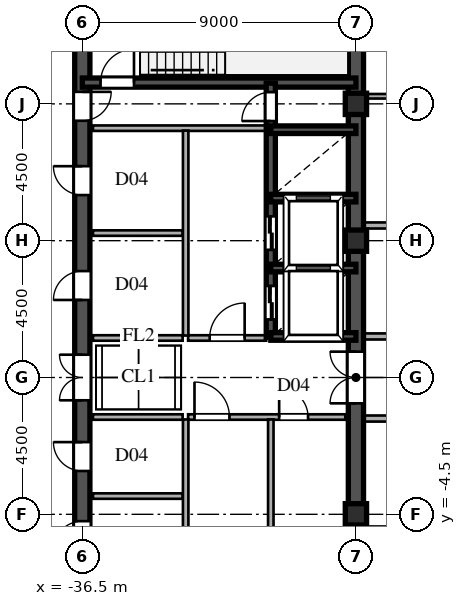
"""IFC4 building model, lengths in metres.
Left out: names, types, materials, properties, quantities, classifications, styles, units other than length and angle.
Written with IfcOpenShell. Run it as: python <this file> out.ifc"""

import sys

from ifc_helpers import new_model, si_unit, direction, frame, frame_2d, origin, origin_2d, place, context, subcontext, project, spatial, rectangle, hollow_rectangle, extrude, source, transform, mapped, element, fill, save


model = new_model("IFC4")
c1 = context("Model", 3, precision=1e-05, world=origin(), true_north=direction((0.0, 1.0)))
c2 = subcontext(c1, "Body", "Model", "MODEL_VIEW")
j1 = project(units=[si_unit("LENGTHUNIT", "METRE"), si_unit("PLANEANGLEUNIT", "RADIAN")], contexts=[c1])
p1 = place(None, origin())
s1 = spatial("IfcSite", under=j1, at=p1, CompositionType="ELEMENT")
p2 = place(p1, origin())
s2 = spatial("IfcBuilding", under=s1, at=p2, CompositionType="ELEMENT")
p3 = place(p2, frame((0.0, 0.0, 243.15)))
s3 = spatial("IfcBuildingStorey", under=s2, at=p3, CompositionType="ELEMENT", Elevation=243.15)
m1 = source(origin(), c2, "Body", "SweptSolid", [
    extrude(hollow_rectangle(XDim=0.7, YDim=0.7, WallThickness=0.03, at=origin_2d()), origin(), (0.0, 0.0, 1.0), 3.75),
])
for number, where, z_axis, x_axis in (
    (1, (-27.5, -4.5, 0.0), (0.0, 0.0, 1.0), (1.0, 0.0, 0.0)),
    (2, (-27.5, 4.5, 0.0), (0.0, 0.0, 1.0), (1.0, 0.0, 0.0)),
    (3, (-27.5, 9.0, 0.0), (0.0, 0.0, 1.0), (1.0, 0.0, 0.0)),
):
    element("IfcColumn", number, at=place(p3, frame(where, z_axis=z_axis, x_axis=x_axis)), inside=s3, PredefinedType="COLUMN", context=c2, shape_type="MappedRepresentation", body=[
        mapped(m1, transform((0.0, 0.0, 0.0), scale=1.0)),
    ])
for number, where, z_axis, x_axis in (
    (4, (-27.5, -13.5, 0.0), (0.0, 0.0, 1.0), (0.0, 1.0, 0.0)),
    (5, (-27.5, 1.3, 0.0), (0.0, 0.0, 1.0), (0.0, 1.0, 0.0)),
):
    element("IfcWall", number, at=place(p3, frame(where, z_axis=z_axis, x_axis=x_axis)), inside=s3, PredefinedType="SHEAR", context=c2, shape_type="SweptSolid", body=[
        extrude(rectangle(XDim=12.2, YDim=0.5, at=frame_2d((6.1, 0.0))), origin(), (0.0, 0.0, 1.0), 3.53),
    ])
p4 = place(p3, frame((-27.5, -1.3, 0.0), z_axis=(0.0, 0.0, 1.0), x_axis=(0.0, 1.0, 0.0)))
e6 = element("IfcWall", 6, at=p4, inside=s3, PredefinedType="SHEAR", context=c2, shape_type="SweptSolid", body=[
    extrude(rectangle(XDim=2.6, YDim=0.5, at=frame_2d((1.3, 0.0))), origin(), (0.0, 0.0, 1.0), 3.53),
])
p5 = place(p4, frame((0.45, 0.0, 0.0)))
e7 = element("IfcOpeningElement", 7, at=p5, cuts=e6, PredefinedType="OPENING", context=c2, shape_type="SweptSolid", body=[
    extrude(rectangle(XDim=1.7, YDim=2.35, at=frame_2d((0.85, 1.175))), frame((0.0, 0.26, 0.0), z_axis=(0.0, -1.0, 0.0), x_axis=(1.0, 0.0, 0.0)), (0.0, 0.0, 1.0), 0.52),
])
p6 = place(p3, frame((-36.5, -1.3, 0.0), z_axis=(0.0, 0.0, 1.0), x_axis=(0.0, 1.0, 0.0)))
e8 = element("IfcWall", 8, at=p6, inside=s3, PredefinedType="SHEAR", context=c2, shape_type="SweptSolid", body=[
    extrude(rectangle(XDim=2.6, YDim=0.5, at=frame_2d((1.3, 0.0))), origin(), (0.0, 0.0, 1.0), 3.53),
])
p7 = place(p6, frame((0.55, 0.0, 0.0)))
e9 = element("IfcOpeningElement", 9, at=p7, cuts=e8, PredefinedType="OPENING", context=c2, shape_type="SweptSolid", body=[
    extrude(rectangle(XDim=1.5, YDim=2.3, at=frame_2d((0.75, 1.15))), frame((0.0, 0.26, 0.0), z_axis=(0.0, -1.0, 0.0), x_axis=(1.0, 0.0, 0.0)), (0.0, 0.0, 1.0), 0.52),
])
p8 = place(p3, frame((-36.5, 8.2, 0.0), z_axis=(0.0, 0.0, 1.0), x_axis=(0.0, 1.0, 0.0)))
e10 = element("IfcWall", 10, at=p8, inside=s3, PredefinedType="SHEAR", context=c2, shape_type="SweptSolid", body=[
    extrude(rectangle(XDim=5.45, YDim=0.5, at=frame_2d((2.725, 0.0))), origin(), (0.0, 0.0, 1.0), 3.53),
])
p9 = place(p8, frame((0.245, 0.0, 0.0)))
e11 = element("IfcOpeningElement", 11, at=p9, cuts=e10, PredefinedType="OPENING", context=c2, shape_type="SweptSolid", body=[
    extrude(rectangle(XDim=0.95, YDim=2.15, at=frame_2d((0.475, 1.075))), frame((0.0, 0.26, 0.0), z_axis=(0.0, -1.0, 0.0), x_axis=(1.0, 0.0, 0.0)), (0.0, 0.0, 1.0), 0.52),
])
p10 = place(p3, frame((-36.5, -6.5, 0.0), z_axis=(0.0, 0.0, 1.0), x_axis=(0.0, 1.0, 0.0)))
e12 = element("IfcWall", 12, at=p10, inside=s3, PredefinedType="SHEAR", context=c2, shape_type="SweptSolid", body=[
    extrude(rectangle(XDim=2.6, YDim=0.5, at=frame_2d((1.3, 0.0))), origin(), (0.0, 0.0, 1.0), 3.53),
])
p11 = place(p10, frame((0.825, 0.0, 0.0)))
e13 = element("IfcOpeningElement", 13, at=p11, cuts=e12, PredefinedType="OPENING", context=c2, shape_type="SweptSolid", body=[
    extrude(rectangle(XDim=0.95, YDim=2.15, at=frame_2d((0.475, 1.075))), frame((0.0, 0.26, 0.0), z_axis=(0.0, -1.0, 0.0), x_axis=(1.0, 0.0, 0.0)), (0.0, 0.0, 1.0), 0.52),
])
p12 = place(p3, frame((-36.5, -3.9, 0.0), z_axis=(0.0, 0.0, 1.0), x_axis=(0.0, 1.0, 0.0)))
e14 = element("IfcWall", 14, at=p12, inside=s3, PredefinedType="SHEAR", context=c2, shape_type="SweptSolid", body=[
    extrude(rectangle(XDim=2.6, YDim=0.5, at=frame_2d((1.3, 0.0))), origin(), (0.0, 0.0, 1.0), 3.53),
])
p13 = place(p12, frame((0.825, 0.0, 0.0)))
e15 = element("IfcOpeningElement", 15, at=p13, cuts=e14, PredefinedType="OPENING", context=c2, shape_type="SweptSolid", body=[
    extrude(rectangle(XDim=0.95, YDim=2.15, at=frame_2d((0.475, 1.075))), frame((0.0, 0.26, 0.0), z_axis=(0.0, -1.0, 0.0), x_axis=(1.0, 0.0, 0.0)), (0.0, 0.0, 1.0), 0.52),
])
p14 = place(p3, frame((-36.5, 1.3, 0.0), z_axis=(0.0, 0.0, 1.0), x_axis=(0.0, 1.0, 0.0)))
e16 = element("IfcWall", 16, at=p14, inside=s3, PredefinedType="SHEAR", context=c2, shape_type="SweptSolid", body=[
    extrude(rectangle(XDim=3.45, YDim=0.5, at=frame_2d((1.725, 0.0))), origin(), (0.0, 0.0, 1.0), 3.53),
])
p15 = place(p14, frame((1.25, 0.0, 0.0)))
e17 = element("IfcOpeningElement", 17, at=p15, cuts=e16, PredefinedType="OPENING", context=c2, shape_type="SweptSolid", body=[
    extrude(rectangle(XDim=0.95, YDim=2.15, at=frame_2d((0.475, 1.075))), frame((0.0, 0.26, 0.0), z_axis=(0.0, -1.0, 0.0), x_axis=(1.0, 0.0, 0.0)), (0.0, 0.0, 1.0), 0.52),
])
p16 = place(p3, frame((-36.5, 4.75, 0.0), z_axis=(0.0, 0.0, 1.0), x_axis=(0.0, 1.0, 0.0)))
e18 = element("IfcWall", 18, at=p16, inside=s3, PredefinedType="SHEAR", context=c2, shape_type="SweptSolid", body=[
    extrude(rectangle(XDim=3.45, YDim=0.5, at=frame_2d((1.725, 0.0))), origin(), (0.0, 0.0, 1.0), 3.53),
])
p17 = place(p16, frame((1.25, 0.0, 0.0)))
e19 = element("IfcOpeningElement", 19, at=p17, cuts=e18, PredefinedType="OPENING", context=c2, shape_type="SweptSolid", body=[
    extrude(rectangle(XDim=0.95, YDim=2.15, at=frame_2d((0.475, 1.075))), frame((0.0, 0.26, 0.0), z_axis=(0.0, -1.0, 0.0), x_axis=(1.0, 0.0, 0.0)), (0.0, 0.0, 1.0), 0.52),
])
p18 = place(p3, frame((-36.5, 9.7, 0.0), z_axis=(0.0, 0.0, 1.0), x_axis=(1.0, 0.0, 0.0)))
e20 = element("IfcWall", 20, at=p18, inside=s3, PredefinedType="SHEAR", context=c2, shape_type="SweptSolid", body=[
    extrude(rectangle(XDim=9.0, YDim=0.3, at=frame_2d((4.5, 0.0))), origin(), (0.0, 0.0, 1.0), 3.53),
])
p19 = place(p18, frame((0.6, 0.0, 0.0)))
e21 = element("IfcOpeningElement", 21, at=p19, cuts=e20, PredefinedType="OPENING", context=c2, shape_type="SweptSolid", body=[
    extrude(rectangle(XDim=1.1, YDim=2.2, at=frame_2d((0.55, 1.1))), frame((0.0, 0.16, 0.0), z_axis=(0.0, -1.0, 0.0), x_axis=(1.0, 0.0, 0.0)), (0.0, 0.0, 1.0), 0.32),
])
for number, where, z_axis, x_axis in (
    (22, (-30.3, 1.35, 0.0), (0.0, 0.0, 1.0), (1.0, 0.0, 0.0)),
    (23, (-30.3, 3.6, 0.0), (0.0, 0.0, 1.0), (1.0, 0.0, 0.0)),
    (24, (-30.3, 5.9, 0.0), (0.0, 0.0, 1.0), (1.0, 0.0, 0.0)),
    (25, (-30.3, 8.15, 0.0), (0.0, 0.0, 1.0), (1.0, 0.0, 0.0)),
):
    element("IfcWall", number, at=place(p3, frame(where, z_axis=z_axis, x_axis=x_axis)), inside=s3, PredefinedType="SHEAR", context=c2, shape_type="SweptSolid", body=[
        extrude(rectangle(XDim=2.8, YDim=0.25, at=frame_2d((1.4, 0.0))), origin(), (0.0, 0.0, 1.0), 3.53),
    ])
p20 = place(p3, frame((-30.3, 1.32, 0.0), z_axis=(0.0, 0.0, 1.0), x_axis=(0.0, 1.0, 0.0)))
e26 = element("IfcWall", 26, at=p20, inside=s3, PredefinedType="SHEAR", context=c2, shape_type="SweptSolid", body=[
    extrude(rectangle(XDim=2.28, YDim=0.3, at=frame_2d((1.14, 0.0))), origin(), (0.0, 0.0, 1.0), 3.53),
])
p21 = place(p20, frame((0.59, 0.0, 0.0)))
e27 = element("IfcOpeningElement", 27, at=p21, cuts=e26, PredefinedType="OPENING", context=c2, shape_type="SweptSolid", body=[
    extrude(rectangle(XDim=1.1, YDim=2.2, at=frame_2d((0.55, 1.1))), frame((0.0, 0.16, 0.0), z_axis=(0.0, -1.0, 0.0), x_axis=(1.0, 0.0, 0.0)), (0.0, 0.0, 1.0), 0.32),
])
p22 = place(p3, frame((-30.3, 3.6, 0.0), z_axis=(0.0, 0.0, 1.0), x_axis=(0.0, 1.0, 0.0)))
e28 = element("IfcWall", 28, at=p22, inside=s3, PredefinedType="SHEAR", context=c2, shape_type="SweptSolid", body=[
    extrude(rectangle(XDim=2.3, YDim=0.3, at=frame_2d((1.15, 0.0))), origin(), (0.0, 0.0, 1.0), 3.53),
])
p23 = place(p22, frame((0.6, 0.0, 0.0)))
e29 = element("IfcOpeningElement", 29, at=p23, cuts=e28, PredefinedType="OPENING", context=c2, shape_type="SweptSolid", body=[
    extrude(rectangle(XDim=1.1, YDim=2.2, at=frame_2d((0.55, 1.1))), frame((0.0, 0.16, 0.0), z_axis=(0.0, -1.0, 0.0), x_axis=(1.0, 0.0, 0.0)), (0.0, 0.0, 1.0), 0.32),
])
p24 = place(p3, frame((-30.3, 5.9, 0.0), z_axis=(0.0, 0.0, 1.0), x_axis=(0.0, 1.0, 0.0)))
e30 = element("IfcWall", 30, at=p24, inside=s3, PredefinedType="SHEAR", context=c2, shape_type="SweptSolid", body=[
    extrude(rectangle(XDim=2.25, YDim=0.3, at=frame_2d((1.125, 0.0))), origin(), (0.0, 0.0, 1.0), 3.53),
])
p25 = place(p3, frame((-30.3, 8.15, 0.0), z_axis=(0.0, 0.0, 1.0), x_axis=(0.0, 1.0, 0.0)))
e31 = element("IfcWall", 31, at=p25, inside=s3, PredefinedType="SHEAR", context=c2, shape_type="SweptSolid", body=[
    extrude(rectangle(XDim=1.53, YDim=0.3, at=frame_2d((0.765, 0.0))), origin(), (0.0, 0.0, 1.0), 3.53),
])
p26 = place(p25, frame((0.285, 0.0, 0.0)))
e32 = element("IfcOpeningElement", 32, at=p26, cuts=e31, PredefinedType="OPENING", context=c2, shape_type="SweptSolid", body=[
    extrude(rectangle(XDim=0.95, YDim=2.15, at=frame_2d((0.475, 1.075))), frame((0.0, 0.16, 0.0), z_axis=(0.0, -1.0, 0.0), x_axis=(1.0, 0.0, 0.0)), (0.0, 0.0, 1.0), 0.32),
])
p27 = place(p3, frame((-36.15, 8.2, 0.0), z_axis=(0.0, 0.0, 1.0), x_axis=(1.0, 0.0, 0.0)))
e33 = element("IfcWall", 33, at=p27, inside=s3, PredefinedType="PARTITIONING", context=c2, shape_type="SweptSolid", body=[
    extrude(rectangle(XDim=5.7, YDim=0.18, at=frame_2d((2.85, 0.0))), origin(), (0.0, 0.0, 1.0), 3.53),
])
p28 = place(p3, frame((-33.1, -6.42, 0.0), z_axis=(0.0, 0.0, 1.0), x_axis=(0.0, 1.0, 0.0)))
e34 = element("IfcWall", 34, at=p28, inside=s3, PredefinedType="PARTITIONING", context=c2, shape_type="SweptSolid", body=[
    extrude(rectangle(XDim=5.04, YDim=0.18, at=frame_2d((2.52, 0.0))), origin(), (0.0, 0.0, 1.0), 3.53),
])
p29 = place(p3, frame((-33.1, 1.38, 0.0), z_axis=(0.0, 0.0, 1.0), x_axis=(0.0, 1.0, 0.0)))
e35 = element("IfcWall", 35, at=p29, inside=s3, PredefinedType="PARTITIONING", context=c2, shape_type="SweptSolid", body=[
    extrude(rectangle(XDim=6.74, YDim=0.18, at=frame_2d((3.37, 0.0))), origin(), (0.0, 0.0, 1.0), 3.53),
])
p30 = place(p3, frame((-30.3, -1.3, 0.0), z_axis=(0.0, 0.0, 1.0), x_axis=(1.0, 0.0, 0.0)))
e36 = element("IfcWall", 36, at=p30, inside=s3, PredefinedType="PARTITIONING", context=c2, shape_type="SweptSolid", body=[
    extrude(rectangle(XDim=2.45, YDim=0.18, at=frame_2d((1.225, 0.0))), origin(), (0.0, 0.0, 1.0), 3.53),
])
p31 = place(p30, frame((0.275, 0.0, 0.0)))
e37 = element("IfcOpeningElement", 37, at=p31, cuts=e36, PredefinedType="OPENING", context=c2, shape_type="SweptSolid", body=[
    extrude(rectangle(XDim=0.95, YDim=2.15, at=frame_2d((0.475, 1.075))), frame((0.0, 0.1, 0.0), z_axis=(0.0, -1.0, 0.0), x_axis=(1.0, 0.0, 0.0)), (0.0, 0.0, 1.0), 0.2),
])
p32 = place(p3, frame((-33.02, -1.3, 0.0), z_axis=(0.0, 0.0, 1.0), x_axis=(1.0, 0.0, 0.0)))
e38 = element("IfcWall", 38, at=p32, inside=s3, PredefinedType="PARTITIONING", context=c2, shape_type="SweptSolid", body=[
    extrude(rectangle(XDim=2.72, YDim=0.18, at=frame_2d((1.36, 0.0))), origin(), (0.0, 0.0, 1.0), 3.53),
])
p33 = place(p32, frame((0.21, 0.0, 0.0)))
e39 = element("IfcOpeningElement", 39, at=p33, cuts=e38, PredefinedType="OPENING", context=c2, shape_type="SweptSolid", body=[
    extrude(rectangle(XDim=1.15, YDim=2.2, at=frame_2d((0.575, 1.1))), frame((0.0, 0.1, 0.0), z_axis=(0.0, -1.0, 0.0), x_axis=(1.0, 0.0, 0.0)), (0.0, 0.0, 1.0), 0.2),
])
p34 = place(p3, frame((-30.3, -7.12, 0.0), z_axis=(0.0, 0.0, 1.0), x_axis=(0.0, 1.0, 0.0)))
e40 = element("IfcWall", 40, at=p34, inside=s3, PredefinedType="PARTITIONING", context=c2, shape_type="SweptSolid", body=[
    extrude(rectangle(XDim=5.74, YDim=0.18, at=frame_2d((2.87, 0.0))), origin(), (0.0, 0.0, 1.0), 3.53),
])
p35 = place(p3, frame((-33.02, 1.3, 0.0), z_axis=(0.0, 0.0, 1.0), x_axis=(1.0, 0.0, 0.0)))
e41 = element("IfcWall", 41, at=p35, inside=s3, PredefinedType="PARTITIONING", context=c2, shape_type="SweptSolid", body=[
    extrude(rectangle(XDim=2.57, YDim=0.18, at=frame_2d((1.285, 0.0))), origin(), (0.0, 0.0, 1.0), 3.53),
])
p36 = place(p35, frame((0.71, 0.0, 0.0)))
e42 = element("IfcOpeningElement", 42, at=p36, cuts=e41, PredefinedType="OPENING", context=c2, shape_type="SweptSolid", body=[
    extrude(rectangle(XDim=1.15, YDim=2.2, at=frame_2d((0.575, 1.1))), frame((0.0, 0.1, 0.0), z_axis=(0.0, -1.0, 0.0), x_axis=(1.0, 0.0, 0.0)), (0.0, 0.0, 1.0), 0.2),
])
for number, where, z_axis, x_axis in (
    (43, (-36.15, -1.3, 0.0), (0.0, 0.0, 1.0), (1.0, 0.0, 0.0)),
    (44, (-36.15, 1.3, 0.0), (0.0, 0.0, 1.0), (1.0, 0.0, 0.0)),
    (45, (-36.15, -3.9, 0.0), (0.0, 0.0, 1.0), (1.0, 0.0, 0.0)),
    (46, (-36.15, 4.75, 0.0), (0.0, 0.0, 1.0), (1.0, 0.0, 0.0)),
):
    element("IfcWall", number, at=place(p3, frame(where, z_axis=z_axis, x_axis=x_axis)), inside=s3, PredefinedType="PARTITIONING", context=c2, shape_type="SweptSolid", body=[
        extrude(rectangle(XDim=2.95, YDim=0.18, at=frame_2d((1.475, 0.0))), origin(), (0.0, 0.0, 1.0), 3.53),
    ])
p37 = place(p3, frame((-27.245, -1.35, 0.0), z_axis=(0.0, 0.0, 1.0), x_axis=(1.0, 0.0, 0.0)))
e47 = element("IfcWall", 47, at=p37, inside=s3, PredefinedType="PARTITIONING", context=c2, shape_type="SweptSolid", body=[
    extrude(rectangle(XDim=19.86, YDim=0.2, at=frame_2d((9.93, 0.0))), origin(), (0.0, 0.0, 1.0), 3.53),
])
p38 = place(p37, frame((12.97, 0.0, 0.0)))
e48 = element("IfcOpeningElement", 48, at=p38, cuts=e47, PredefinedType="OPENING", context=c2, shape_type="SweptSolid", body=[
    extrude(rectangle(XDim=1.05, YDim=2.25, at=frame_2d((0.525, 1.125))), frame((0.0, 0.11, 0.0), z_axis=(0.0, -1.0, 0.0), x_axis=(1.0, 0.0, 0.0)), (0.0, 0.0, 1.0), 0.22),
])
p39 = place(p3, frame((-27.245, 1.35, 0.0), z_axis=(0.0, 0.0, 1.0), x_axis=(1.0, 0.0, 0.0)))
e49 = element("IfcWall", 49, at=p39, inside=s3, PredefinedType="PARTITIONING", context=c2, shape_type="SweptSolid", body=[
    extrude(rectangle(XDim=19.86, YDim=0.2, at=frame_2d((9.93, 0.0))), origin(), (0.0, 0.0, 1.0), 3.53),
])
p40 = place(p39, frame((12.97, 0.0, 0.0)))
e50 = element("IfcOpeningElement", 50, at=p40, cuts=e49, PredefinedType="OPENING", context=c2, shape_type="SweptSolid", body=[
    extrude(rectangle(XDim=1.05, YDim=2.25, at=frame_2d((0.525, 1.125))), frame((0.0, 0.11, 0.0), z_axis=(0.0, -1.0, 0.0), x_axis=(1.0, 0.0, 0.0)), (0.0, 0.0, 1.0), 0.22),
])
p41 = place(p3, frame((-27.245, 5.0, 0.0), z_axis=(0.0, 0.0, 1.0), x_axis=(1.0, 0.0, 0.0)))
e51 = element("IfcWall", 51, at=p41, inside=s3, PredefinedType="PARTITIONING", context=c2, shape_type="SweptSolid", body=[
    extrude(rectangle(XDim=54.49, YDim=0.2, at=frame_2d((27.245, 0.0))), origin(), (0.0, 0.0, 1.0), 3.53),
])
p42 = place(p41, frame((23.47, 0.0, 0.0)))
e52 = element("IfcOpeningElement", 52, at=p42, cuts=e51, PredefinedType="OPENING", context=c2, shape_type="SweptSolid", body=[
    extrude(rectangle(XDim=1.05, YDim=2.25, at=frame_2d((0.525, 1.125))), frame((0.0, 0.11, 0.0), z_axis=(0.0, -1.0, 0.0), x_axis=(1.0, 0.0, 0.0)), (0.0, 0.0, 1.0), 0.22),
])
p43 = place(p3, frame((-27.245, 9.25, 0.0), z_axis=(0.0, 0.0, 1.0), x_axis=(1.0, 0.0, 0.0)))
e53 = element("IfcWall", 53, at=p43, inside=s3, PredefinedType="PARTITIONING", context=c2, shape_type="SweptSolid", body=[
    extrude(rectangle(XDim=6.66, YDim=0.15, at=frame_2d((3.33, 0.0))), origin(), (0.0, 0.0, 1.0), 3.53),
])
p44 = place(p43, frame((3.07, 0.0, 0.0)))
e54 = element("IfcOpeningElement", 54, at=p44, cuts=e53, PredefinedType="OPENING", context=c2, shape_type="SweptSolid", body=[
    extrude(rectangle(XDim=0.95, YDim=2.15, at=frame_2d((0.475, 1.075))), frame((0.0, 0.085, 0.0), z_axis=(0.0, -1.0, 0.0), x_axis=(1.0, 0.0, 0.0)), (0.0, 0.0, 1.0), 0.17),
])
m2 = source(origin(), c2, "Body", "SweptSolid", [
    extrude(rectangle(XDim=1.7, YDim=2.35, at=frame_2d((0.85, 1.175))), frame((0.0, 0.025, 0.0), z_axis=(0.0, -1.0, 0.0), x_axis=(1.0, 0.0, 0.0)), (0.0, 0.0, 1.0), 0.05),
])
p45 = place(p5, origin())
e55 = element("IfcDoor", 55, at=p45, inside=s3, OperationType="DOUBLE_SWING_LEFT", PredefinedType="DOOR", context=c2, shape_type="MappedRepresentation", body=[
    mapped(m2, transform((0.0, 0.0, 0.0), scale=1.0)),
])
fill(e7, e55)
m3 = source(origin(), c2, "Body", "SweptSolid", [
    extrude(rectangle(XDim=1.5, YDim=2.3, at=frame_2d((0.75, 1.15))), frame((0.0, 0.025, 0.0), z_axis=(0.0, -1.0, 0.0), x_axis=(1.0, 0.0, 0.0)), (0.0, 0.0, 1.0), 0.05),
])
p46 = place(p7, origin())
e56 = element("IfcDoor", 56, at=p46, inside=s3, OperationType="DOUBLE_SWING_LEFT", PredefinedType="DOOR", context=c2, shape_type="MappedRepresentation", body=[
    mapped(m3, transform((0.0, 0.0, 0.0), scale=1.0)),
])
fill(e9, e56)
m4 = source(origin(), c2, "Body", "SweptSolid", [
    extrude(rectangle(XDim=0.95, YDim=2.15, at=frame_2d((0.475, 1.075))), frame((0.0, 0.025, 0.0), z_axis=(0.0, -1.0, 0.0), x_axis=(1.0, 0.0, 0.0)), (0.0, 0.0, 1.0), 0.05),
])
p47 = place(p9, frame((0.95, 0.0, 0.0), z_axis=(0.0, 0.0, 1.0), x_axis=(-1.0, 0.0, 0.0)))
e57 = element("IfcDoor", 57, at=p47, inside=s3, OperationType="SINGLE_SWING_RIGHT", PredefinedType="DOOR", context=c2, shape_type="MappedRepresentation", body=[
    mapped(m4, transform((0.0, 0.0, 0.0), scale=1.0)),
])
fill(e11, e57)
p48 = place(p11, origin())
e58 = element("IfcDoor", 58, at=p48, inside=s3, OperationType="SINGLE_SWING_LEFT", PredefinedType="DOOR", context=c2, shape_type="MappedRepresentation", body=[
    mapped(m4, transform((0.0, 0.0, 0.0), scale=1.0)),
])
fill(e13, e58)
p49 = place(p13, origin())
e59 = element("IfcDoor", 59, at=p49, inside=s3, OperationType="SINGLE_SWING_RIGHT", PredefinedType="DOOR", context=c2, shape_type="MappedRepresentation", body=[
    mapped(m4, transform((0.0, 0.0, 0.0), scale=1.0)),
])
fill(e15, e59)
p50 = place(p15, origin())
e60 = element("IfcDoor", 60, at=p50, inside=s3, OperationType="SINGLE_SWING_LEFT", PredefinedType="DOOR", context=c2, shape_type="MappedRepresentation", body=[
    mapped(m4, transform((0.0, 0.0, 0.0), scale=1.0)),
])
fill(e17, e60)
p51 = place(p17, origin())
e61 = element("IfcDoor", 61, at=p51, inside=s3, OperationType="SINGLE_SWING_RIGHT", PredefinedType="DOOR", context=c2, shape_type="MappedRepresentation", body=[
    mapped(m4, transform((0.0, 0.0, 0.0), scale=1.0)),
])
fill(e19, e61)
m5 = source(origin(), c2, "Body", "SweptSolid", [
    extrude(rectangle(XDim=1.1, YDim=2.2, at=frame_2d((0.55, 1.1))), frame((0.0, 0.025, 0.0), z_axis=(0.0, -1.0, 0.0), x_axis=(1.0, 0.0, 0.0)), (0.0, 0.0, 1.0), 0.05),
])
p52 = place(p19, origin())
e62 = element("IfcDoor", 62, at=p52, inside=s3, OperationType="SINGLE_SWING_RIGHT", PredefinedType="DOOR", context=c2, shape_type="MappedRepresentation", body=[
    mapped(m5, transform((0.0, 0.0, 0.0), scale=1.0)),
])
fill(e21, e62)
m6 = source(origin(), c2, "Body", "SweptSolid", [
    extrude(rectangle(XDim=1.1, YDim=2.2, at=frame_2d((0.55, 1.1))), frame((0.0, 0.025, 0.0), z_axis=(0.0, -1.0, 0.0), x_axis=(1.0, 0.0, 0.0)), (0.0, 0.0, 1.0), 0.05),
])
p53 = place(p21, origin())
e63 = element("IfcDoor", 63, at=p53, inside=s3, OperationType="DOUBLE_DOOR_SLIDING", PredefinedType="DOOR", context=c2, shape_type="MappedRepresentation", body=[
    mapped(m6, transform((0.0, 0.0, 0.0), scale=1.0)),
])
fill(e27, e63)
p54 = place(p23, origin())
e64 = element("IfcDoor", 64, at=p54, inside=s3, OperationType="DOUBLE_DOOR_SLIDING", PredefinedType="DOOR", context=c2, shape_type="MappedRepresentation", body=[
    mapped(m6, transform((0.0, 0.0, 0.0), scale=1.0)),
])
fill(e29, e64)
p55 = place(p26, origin())
e65 = element("IfcDoor", 65, at=p55, inside=s3, OperationType="SINGLE_SWING_LEFT", PredefinedType="DOOR", context=c2, shape_type="MappedRepresentation", body=[
    mapped(m4, transform((0.0, 0.0, 0.0), scale=1.0)),
])
fill(e32, e65)
p56 = place(p31, origin())
e66 = element("IfcDoor", 66, at=p56, inside=s3, OperationType="SINGLE_SWING_LEFT", PredefinedType="DOOR", context=c2, shape_type="MappedRepresentation", body=[
    mapped(m4, transform((0.0, 0.0, 0.0), scale=1.0)),
])
fill(e37, e66)
m7 = source(origin(), c2, "Body", "SweptSolid", [
    extrude(rectangle(XDim=1.15, YDim=2.2, at=frame_2d((0.575, 1.1))), frame((0.0, 0.025, 0.0), z_axis=(0.0, -1.0, 0.0), x_axis=(1.0, 0.0, 0.0)), (0.0, 0.0, 1.0), 0.05),
])
p57 = place(p33, origin())
e67 = element("IfcDoor", 67, at=p57, inside=s3, OperationType="SINGLE_SWING_LEFT", PredefinedType="DOOR", context=c2, shape_type="MappedRepresentation", body=[
    mapped(m7, transform((0.0, 0.0, 0.0), scale=1.0)),
])
fill(e39, e67)
p58 = place(p36, origin())
e68 = element("IfcDoor", 68, at=p58, inside=s3, OperationType="SINGLE_SWING_RIGHT", PredefinedType="DOOR", context=c2, shape_type="MappedRepresentation", body=[
    mapped(m7, transform((0.0, 0.0, 0.0), scale=1.0)),
])
fill(e42, e68)
save(model, sys.argv[1])
